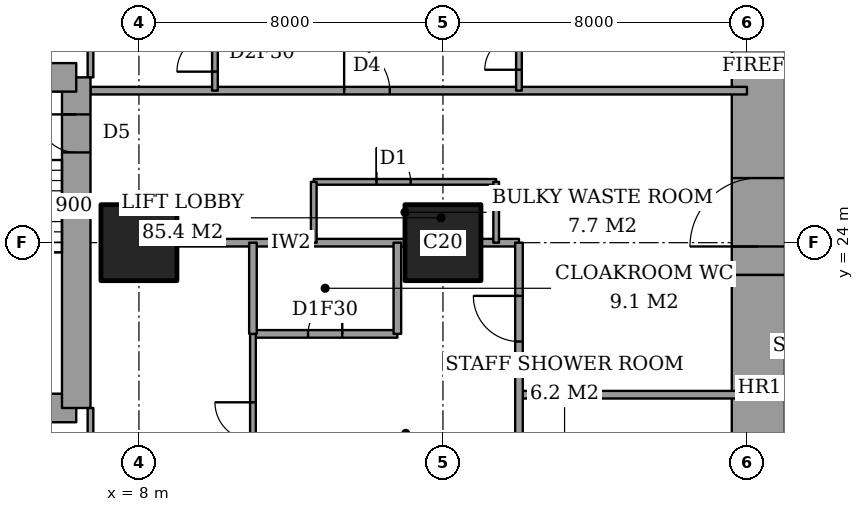
"""IFC4 building model, lengths in metres.
Left out: names, types, materials, properties, quantities, classifications, styles, units other than length and angle.
Written with IfcOpenShell. Run it as: python <this file> out.ifc"""

import sys

from ifc_helpers import new_model, si_unit, direction, frame, frame_2d, origin, origin_2d, place, context, subcontext, project, spatial, rectangle, extrude, element, fill, save


model = new_model("IFC4")
c1 = context("Model", 3, precision=1e-05, world=origin(), true_north=direction((0.0, 1.0)))
c2 = subcontext(c1, "Body", "Model", "MODEL_VIEW")
j1 = project(units=[si_unit("LENGTHUNIT", "METRE"), si_unit("PLANEANGLEUNIT", "RADIAN")], contexts=[c1])
p1 = place(None, origin())
s1 = spatial("IfcSite", under=j1, at=p1, CompositionType="ELEMENT")
p2 = place(p1, origin())
s2 = spatial("IfcBuilding", under=s1, at=p2, CompositionType="ELEMENT")
p3 = place(p2, frame((0.0, 0.0, 99.8)))
s3 = spatial("IfcBuildingStorey", under=s2, at=p3, CompositionType="ELEMENT", Elevation=99.8)
for number, where, z_axis, x_axis in (
    (1, (8.0, 24.0, 0.0), (0.0, 0.0, 1.0), (1.0, 0.0, 0.0)),
    (2, (16.0, 24.0, 0.0), (0.0, 0.0, 1.0), (1.0, 0.0, 0.0)),
):
    element("IfcColumn", number, at=place(p3, frame(where, z_axis=z_axis, x_axis=x_axis)), inside=s3, PredefinedType="COLUMN", context=c2, shape_type="SweptSolid", body=[
        extrude(rectangle(XDim=2.0, YDim=2.0, at=origin_2d()), origin(), (0.0, 0.0, 1.0), 3.6),
    ])
p4 = place(p3, frame((24.3, 13.0, 0.0), z_axis=(0.0, 0.0, 1.0), x_axis=(0.0, 1.0, 0.0)))
e3 = element("IfcWall", 3, at=p4, inside=s3, PredefinedType="SHEAR", context=c2, shape_type="SweptSolid", body=[
    extrude(rectangle(XDim=10.15, YDim=1.4, at=frame_2d((5.075, 0.0))), origin(), (0.0, 0.0, 1.0), 3.6),
])
p5 = place(p3, frame((24.3, 23.15, 0.0), z_axis=(0.0, 0.0, 1.0), x_axis=(0.0, 1.0, 0.0)))
e4 = element("IfcWall", 4, at=p5, inside=s3, PredefinedType="SHEAR", context=c2, shape_type="SweptSolid", body=[
    extrude(rectangle(XDim=11.85, YDim=1.4, at=frame_2d((5.925, 0.0))), origin(), (0.0, 0.0, 1.0), 3.6),
])
p6 = place(p5, frame((0.75, 0.0, 0.0)))
e5 = element("IfcOpeningElement", 5, at=p6, cuts=e4, PredefinedType="OPENING", context=c2, shape_type="SweptSolid", body=[
    extrude(rectangle(XDim=1.8, YDim=2.4, at=frame_2d((0.9, 1.2))), frame((0.0, 0.71, 0.0), z_axis=(0.0, -1.0, 0.0), x_axis=(1.0, 0.0, 0.0)), (0.0, 0.0, 1.0), 1.42),
])
p7 = place(p3, frame((1.9, 19.65, 0.0), z_axis=(0.0, 0.0, 1.0), x_axis=(1.0, 0.0, 0.0)))
e6 = element("IfcWall", 6, at=p7, inside=s3, PredefinedType="SHEAR", context=c2, shape_type="SweptSolid", body=[
    extrude(rectangle(XDim=4.45, YDim=0.75, at=frame_2d((2.225, 0.0))), origin(), (0.0, 0.0, 1.0), 3.6),
])
p8 = place(p3, frame((6.35, 19.65, 0.0), z_axis=(0.0, 0.0, 1.0), x_axis=(0.0, 1.0, 0.0)))
e7 = element("IfcWall", 7, at=p8, inside=s3, PredefinedType="SHEAR", context=c2, shape_type="SweptSolid", body=[
    extrude(rectangle(XDim=8.7, YDim=0.75, at=frame_2d((4.35, 0.0))), origin(), (0.0, 0.0, 1.0), 3.6),
])
p9 = place(p8, frame((6.725, 0.0, 0.0)))
e8 = element("IfcOpeningElement", 8, at=p9, cuts=e7, PredefinedType="OPENING", context=c2, shape_type="SweptSolid", body=[
    extrude(rectangle(XDim=1.0, YDim=2.1, at=frame_2d((0.5, 1.05))), frame((0.0, 0.385, 0.0), z_axis=(0.0, -1.0, 0.0), x_axis=(1.0, 0.0, 0.0)), (0.0, 0.0, 1.0), 0.77),
])
p10 = place(p3, frame((6.35, 28.35, 0.0), z_axis=(0.0, 0.0, 1.0), x_axis=(-1.0, 0.0, 0.0)))
e9 = element("IfcWall", 9, at=p10, inside=s3, PredefinedType="SHEAR", context=c2, shape_type="SweptSolid", body=[
    extrude(rectangle(XDim=4.45, YDim=0.75, at=frame_2d((2.225, 0.0))), origin(), (0.0, 0.0, 1.0), 3.6),
])
p11 = place(p3, frame((18.0, 20.0, 0.0), z_axis=(0.0, 0.0, 1.0), x_axis=(1.0, 0.0, 0.0)))
e10 = element("IfcWall", 10, at=p11, inside=s3, PredefinedType="PARTITIONING", context=c2, shape_type="SweptSolid", body=[
    extrude(rectangle(XDim=6.0, YDim=0.2, at=frame_2d((3.0, 0.0))), origin(), (0.0, 0.0, 1.0), 3.35),
])
p12 = place(p3, frame((11.0, 21.6, 0.0), z_axis=(0.0, 0.0, 1.0), x_axis=(1.0, 0.0, 0.0)))
e11 = element("IfcWall", 11, at=p12, inside=s3, PredefinedType="PARTITIONING", context=c2, shape_type="SweptSolid", body=[
    extrude(rectangle(XDim=3.8, YDim=0.2, at=frame_2d((1.9, 0.0))), origin(), (0.0, 0.0, 1.0), 3.35),
])
p13 = place(p12, frame((1.45, 0.0, 0.0)))
e12 = element("IfcOpeningElement", 12, at=p13, cuts=e11, PredefinedType="OPENING", context=c2, shape_type="SweptSolid", body=[
    extrude(rectangle(XDim=0.9, YDim=2.1, at=frame_2d((0.45, 1.05))), frame((0.0, 0.11, 0.0), z_axis=(0.0, -1.0, 0.0), x_axis=(1.0, 0.0, 0.0)), (0.0, 0.0, 1.0), 0.22),
])
p14 = place(p3, frame((9.0, 24.0, 0.0), z_axis=(0.0, 0.0, 1.0), x_axis=(1.0, 0.0, 0.0)))
e13 = element("IfcWall", 13, at=p14, inside=s3, PredefinedType="PARTITIONING", context=c2, shape_type="SweptSolid", body=[
    extrude(rectangle(XDim=6.0, YDim=0.2, at=frame_2d((3.0, 0.0))), origin(), (0.0, 0.0, 1.0), 3.35),
])
p15 = place(p3, frame((17.0, 24.0, 0.0), z_axis=(0.0, 0.0, 1.0), x_axis=(1.0, 0.0, 0.0)))
e14 = element("IfcWall", 14, at=p15, inside=s3, PredefinedType="PARTITIONING", context=c2, shape_type="SweptSolid", body=[
    extrude(rectangle(XDim=1.0, YDim=0.2, at=frame_2d((0.5, 0.0))), origin(), (0.0, 0.0, 1.0), 3.35),
])
p16 = place(p3, frame((12.6, 25.6, 0.0), z_axis=(0.0, 0.0, 1.0), x_axis=(1.0, 0.0, 0.0)))
e15 = element("IfcWall", 15, at=p16, inside=s3, PredefinedType="PARTITIONING", context=c2, shape_type="SweptSolid", body=[
    extrude(rectangle(XDim=4.8, YDim=0.15, at=frame_2d((2.4, 0.0))), origin(), (0.0, 0.0, 1.0), 3.35),
])
p17 = place(p16, frame((1.65, 0.0, 0.0)))
e16 = element("IfcOpeningElement", 16, at=p17, cuts=e15, PredefinedType="OPENING", context=c2, shape_type="SweptSolid", body=[
    extrude(rectangle(XDim=0.9, YDim=2.1, at=frame_2d((0.45, 1.05))), frame((0.0, 0.085, 0.0), z_axis=(0.0, -1.0, 0.0), x_axis=(1.0, 0.0, 0.0)), (0.0, 0.0, 1.0), 0.17),
])
p18 = place(p3, frame((6.725, 28.0, 0.0), z_axis=(0.0, 0.0, 1.0), x_axis=(1.0, 0.0, 0.0)))
e17 = element("IfcWall", 17, at=p18, inside=s3, PredefinedType="PARTITIONING", context=c2, shape_type="SweptSolid", body=[
    extrude(rectangle(XDim=17.275, YDim=0.2, at=frame_2d((8.637, 0.0))), origin(), (0.0, 0.0, 1.0), 3.35),
])
p19 = place(p18, frame((6.675, 0.0, 0.0)))
e18 = element("IfcOpeningElement", 18, at=p19, cuts=e17, PredefinedType="OPENING", context=c2, shape_type="SweptSolid", body=[
    extrude(rectangle(XDim=1.2, YDim=2.4, at=frame_2d((0.6, 1.2))), frame((0.0, 0.11, 0.0), z_axis=(0.0, -1.0, 0.0), x_axis=(1.0, 0.0, 0.0)), (0.0, 0.0, 1.0), 0.22),
])
p20 = place(p3, frame((6.725, 17.2, 0.0), z_axis=(0.0, 0.0, 1.0), x_axis=(0.0, 1.0, 0.0)))
e19 = element("IfcWall", 19, at=p20, inside=s3, PredefinedType="PARTITIONING", context=c2, shape_type="SweptSolid", body=[
    extrude(rectangle(XDim=2.45, YDim=0.15, at=frame_2d((1.225, 0.0))), origin(), (0.0, 0.0, 1.0), 3.35),
])
p21 = place(p20, frame((0.587, 0.0, 0.0)))
e20 = element("IfcOpeningElement", 20, at=p21, cuts=e19, PredefinedType="OPENING", context=c2, shape_type="SweptSolid", body=[
    extrude(rectangle(XDim=0.9, YDim=2.1, at=frame_2d((0.45, 1.05))), frame((0.0, 0.085, 0.0), z_axis=(0.0, -1.0, 0.0), x_axis=(1.0, 0.0, 0.0)), (0.0, 0.0, 1.0), 0.17),
])
p22 = place(p3, frame((6.725, 28.35, 0.0), z_axis=(0.0, 0.0, 1.0), x_axis=(0.0, 1.0, 0.0)))
e21 = element("IfcWall", 21, at=p22, inside=s3, PredefinedType="PARTITIONING", context=c2, shape_type="SweptSolid", body=[
    extrude(rectangle(XDim=2.45, YDim=0.15, at=frame_2d((1.225, 0.0))), origin(), (0.0, 0.0, 1.0), 3.35),
])
p23 = place(p22, frame((0.913, 0.0, 0.0)))
e22 = element("IfcOpeningElement", 22, at=p23, cuts=e21, PredefinedType="OPENING", context=c2, shape_type="SweptSolid", body=[
    extrude(rectangle(XDim=1.0, YDim=2.1, at=frame_2d((0.5, 1.05))), frame((0.0, 0.085, 0.0), z_axis=(0.0, -1.0, 0.0), x_axis=(1.0, 0.0, 0.0)), (0.0, 0.0, 1.0), 0.17),
])
p24 = place(p3, frame((10.0, 28.0, 0.0), z_axis=(0.0, 0.0, 1.0), x_axis=(0.0, 1.0, 0.0)))
e23 = element("IfcWall", 23, at=p24, inside=s3, PredefinedType="PARTITIONING", context=c2, shape_type="SweptSolid", body=[
    extrude(rectangle(XDim=9.4, YDim=0.15, at=frame_2d((4.7, 0.0))), origin(), (0.0, 0.0, 1.0), 3.35),
])
p25 = place(p24, frame((0.5, 0.0, 0.0)))
e24 = element("IfcOpeningElement", 24, at=p25, cuts=e23, PredefinedType="OPENING", context=c2, shape_type="SweptSolid", body=[
    extrude(rectangle(XDim=1.0, YDim=2.1, at=frame_2d((0.5, 1.05))), frame((0.0, 0.085, 0.0), z_axis=(0.0, -1.0, 0.0), x_axis=(1.0, 0.0, 0.0)), (0.0, 0.0, 1.0), 0.17),
])
p26 = place(p3, frame((11.0, 21.6, 0.0), z_axis=(0.0, 0.0, 1.0), x_axis=(0.0, 1.0, 0.0)))
e25 = element("IfcWall", 25, at=p26, inside=s3, PredefinedType="PARTITIONING", context=c2, shape_type="SweptSolid", body=[
    extrude(rectangle(XDim=2.4, YDim=0.2, at=frame_2d((1.2, 0.0))), origin(), (0.0, 0.0, 1.0), 3.35),
])
p27 = place(p3, frame((11.0, 10.8, 0.0), z_axis=(0.0, 0.0, 1.0), x_axis=(0.0, 1.0, 0.0)))
e26 = element("IfcWall", 26, at=p27, inside=s3, PredefinedType="PARTITIONING", context=c2, shape_type="SweptSolid", body=[
    extrude(rectangle(XDim=10.8, YDim=0.15, at=frame_2d((5.4, 0.0))), origin(), (0.0, 0.0, 1.0), 3.35),
])
p28 = place(p27, frame((8.0, 0.0, 0.0)))
e27 = element("IfcOpeningElement", 27, at=p28, cuts=e26, PredefinedType="OPENING", context=c2, shape_type="SweptSolid", body=[
    extrude(rectangle(XDim=1.0, YDim=2.1, at=frame_2d((0.5, 1.05))), frame((0.0, 0.085, 0.0), z_axis=(0.0, -1.0, 0.0), x_axis=(1.0, 0.0, 0.0)), (0.0, 0.0, 1.0), 0.17),
])
p29 = place(p3, frame((12.6, 24.0, 0.0), z_axis=(0.0, 0.0, 1.0), x_axis=(0.0, 1.0, 0.0)))
e28 = element("IfcWall", 28, at=p29, inside=s3, PredefinedType="PARTITIONING", context=c2, shape_type="SweptSolid", body=[
    extrude(rectangle(XDim=1.6, YDim=0.15, at=frame_2d((0.8, 0.0))), origin(), (0.0, 0.0, 1.0), 3.35),
])
p30 = place(p3, frame((14.8, 21.6, 0.0), z_axis=(0.0, 0.0, 1.0), x_axis=(0.0, 1.0, 0.0)))
e29 = element("IfcWall", 29, at=p30, inside=s3, PredefinedType="PARTITIONING", context=c2, shape_type="SweptSolid", body=[
    extrude(rectangle(XDim=2.4, YDim=0.2, at=frame_2d((1.2, 0.0))), origin(), (0.0, 0.0, 1.0), 3.35),
])
p31 = place(p3, frame((17.4, 24.0, 0.0), z_axis=(0.0, 0.0, 1.0), x_axis=(0.0, 1.0, 0.0)))
e30 = element("IfcWall", 30, at=p31, inside=s3, PredefinedType="PARTITIONING", context=c2, shape_type="SweptSolid", body=[
    extrude(rectangle(XDim=1.6, YDim=0.15, at=frame_2d((0.8, 0.0))), origin(), (0.0, 0.0, 1.0), 3.35),
])
p32 = place(p3, frame((18.0, 17.0, 0.0), z_axis=(0.0, 0.0, 1.0), x_axis=(0.0, 1.0, 0.0)))
e31 = element("IfcWall", 31, at=p32, inside=s3, PredefinedType="PARTITIONING", context=c2, shape_type="SweptSolid", body=[
    extrude(rectangle(XDim=7.0, YDim=0.2, at=frame_2d((3.5, 0.0))), origin(), (0.0, 0.0, 1.0), 3.35),
])
p33 = place(p32, frame((4.4, 0.0, 0.0)))
e32 = element("IfcOpeningElement", 32, at=p33, cuts=e31, PredefinedType="OPENING", context=c2, shape_type="SweptSolid", body=[
    extrude(rectangle(XDim=1.2, YDim=2.4, at=frame_2d((0.6, 1.2))), frame((0.0, 0.11, 0.0), z_axis=(0.0, -1.0, 0.0), x_axis=(1.0, 0.0, 0.0)), (0.0, 0.0, 1.0), 0.22),
])
p34 = place(p32, frame((1.05, 0.0, 0.0)))
e33 = element("IfcOpeningElement", 33, at=p34, cuts=e31, PredefinedType="OPENING", context=c2, shape_type="SweptSolid", body=[
    extrude(rectangle(XDim=0.9, YDim=2.1, at=frame_2d((0.45, 1.05))), frame((0.0, 0.11, 0.0), z_axis=(0.0, -1.0, 0.0), x_axis=(1.0, 0.0, 0.0)), (0.0, 0.0, 1.0), 0.22),
])
p35 = place(p3, frame((18.0, 28.0, 0.0), z_axis=(0.0, 0.0, 1.0), x_axis=(0.0, 1.0, 0.0)))
e34 = element("IfcWall", 34, at=p35, inside=s3, PredefinedType="PARTITIONING", context=c2, shape_type="SweptSolid", body=[
    extrude(rectangle(XDim=9.4, YDim=0.15, at=frame_2d((4.7, 0.0))), origin(), (0.0, 0.0, 1.0), 3.35),
])
p36 = place(p35, frame((0.55, 0.0, 0.0)))
e35 = element("IfcOpeningElement", 35, at=p36, cuts=e34, PredefinedType="OPENING", context=c2, shape_type="SweptSolid", body=[
    extrude(rectangle(XDim=0.9, YDim=2.1, at=frame_2d((0.45, 1.05))), frame((0.0, 0.085, 0.0), z_axis=(0.0, -1.0, 0.0), x_axis=(1.0, 0.0, 0.0)), (0.0, 0.0, 1.0), 0.17),
])
p37 = place(p28, origin())
e36 = element("IfcDoor", 36, at=p37, inside=s3, OperationType="SINGLE_SWING_LEFT", PredefinedType="DOOR", context=c2, shape_type="SweptSolid", body=[
    extrude(rectangle(XDim=1.0, YDim=2.1, at=frame_2d((0.5, 1.05))), frame((0.0, 0.025, 0.0), z_axis=(0.0, -1.0, 0.0), x_axis=(1.0, 0.0, 0.0)), (0.0, 0.0, 1.0), 0.05),
])
fill(e27, e36)
p38 = place(p13, origin())
e37 = element("IfcDoor", 37, at=p38, inside=s3, OperationType="SINGLE_SWING_LEFT", PredefinedType="DOOR", context=c2, shape_type="SweptSolid", body=[
    extrude(rectangle(XDim=0.9, YDim=2.1, at=frame_2d((0.45, 1.05))), frame((0.0, 0.025, 0.0), z_axis=(0.0, -1.0, 0.0), x_axis=(1.0, 0.0, 0.0)), (0.0, 0.0, 1.0), 0.05),
])
fill(e12, e37)
p39 = place(p33, origin())
e38 = element("IfcDoor", 38, at=p39, inside=s3, OperationType="SINGLE_SWING_LEFT", PredefinedType="DOOR", context=c2, shape_type="SweptSolid", body=[
    extrude(rectangle(XDim=1.2, YDim=2.4, at=frame_2d((0.6, 1.2))), frame((0.0, 0.025, 0.0), z_axis=(0.0, -1.0, 0.0), x_axis=(1.0, 0.0, 0.0)), (0.0, 0.0, 1.0), 0.05),
])
fill(e32, e38)
p40 = place(p25, origin())
e39 = element("IfcDoor", 39, at=p40, inside=s3, OperationType="SINGLE_SWING_RIGHT", PredefinedType="DOOR", context=c2, shape_type="SweptSolid", body=[
    extrude(rectangle(XDim=1.0, YDim=2.1, at=frame_2d((0.5, 1.05))), frame((0.0, 0.025, 0.0), z_axis=(0.0, -1.0, 0.0), x_axis=(1.0, 0.0, 0.0)), (0.0, 0.0, 1.0), 0.05),
])
fill(e24, e39)
p41 = place(p19, origin())
e40 = element("IfcDoor", 40, at=p41, inside=s3, OperationType="SINGLE_SWING_RIGHT", PredefinedType="DOOR", context=c2, shape_type="SweptSolid", body=[
    extrude(rectangle(XDim=1.2, YDim=2.4, at=frame_2d((0.6, 1.2))), frame((0.0, 0.025, 0.0), z_axis=(0.0, -1.0, 0.0), x_axis=(1.0, 0.0, 0.0)), (0.0, 0.0, 1.0), 0.05),
])
fill(e18, e40)
p42 = place(p36, origin())
e41 = element("IfcDoor", 41, at=p42, inside=s3, OperationType="SINGLE_SWING_RIGHT", PredefinedType="DOOR", context=c2, shape_type="SweptSolid", body=[
    extrude(rectangle(XDim=0.9, YDim=2.1, at=frame_2d((0.45, 1.05))), frame((0.0, 0.025, 0.0), z_axis=(0.0, -1.0, 0.0), x_axis=(1.0, 0.0, 0.0)), (0.0, 0.0, 1.0), 0.05),
])
fill(e35, e41)
p43 = place(p17, origin())
e42 = element("IfcDoor", 42, at=p43, inside=s3, OperationType="SINGLE_SWING_RIGHT", PredefinedType="DOOR", context=c2, shape_type="SweptSolid", body=[
    extrude(rectangle(XDim=0.9, YDim=2.1, at=frame_2d((0.45, 1.05))), frame((0.0, 0.025, 0.0), z_axis=(0.0, -1.0, 0.0), x_axis=(1.0, 0.0, 0.0)), (0.0, 0.0, 1.0), 0.05),
])
fill(e16, e42)
p44 = place(p6, origin())
e43 = element("IfcDoor", 43, at=p44, inside=s3, OperationType="DOUBLE_DOOR_DOUBLE_SWING", PredefinedType="DOOR", context=c2, shape_type="SweptSolid", body=[
    extrude(rectangle(XDim=1.8, YDim=2.4, at=frame_2d((0.9, 1.2))), frame((0.0, 0.025, 0.0), z_axis=(0.0, -1.0, 0.0), x_axis=(1.0, 0.0, 0.0)), (0.0, 0.0, 1.0), 0.05),
])
fill(e5, e43)
p45 = place(p9, origin())
e44 = element("IfcDoor", 44, at=p45, inside=s3, OperationType="SINGLE_SWING_LEFT", PredefinedType="DOOR", context=c2, shape_type="SweptSolid", body=[
    extrude(rectangle(XDim=1.0, YDim=2.1, at=frame_2d((0.5, 1.05))), frame((0.0, 0.025, 0.0), z_axis=(0.0, -1.0, 0.0), x_axis=(1.0, 0.0, 0.0)), (0.0, 0.0, 1.0), 0.05),
])
fill(e8, e44)
save(model, sys.argv[1])
